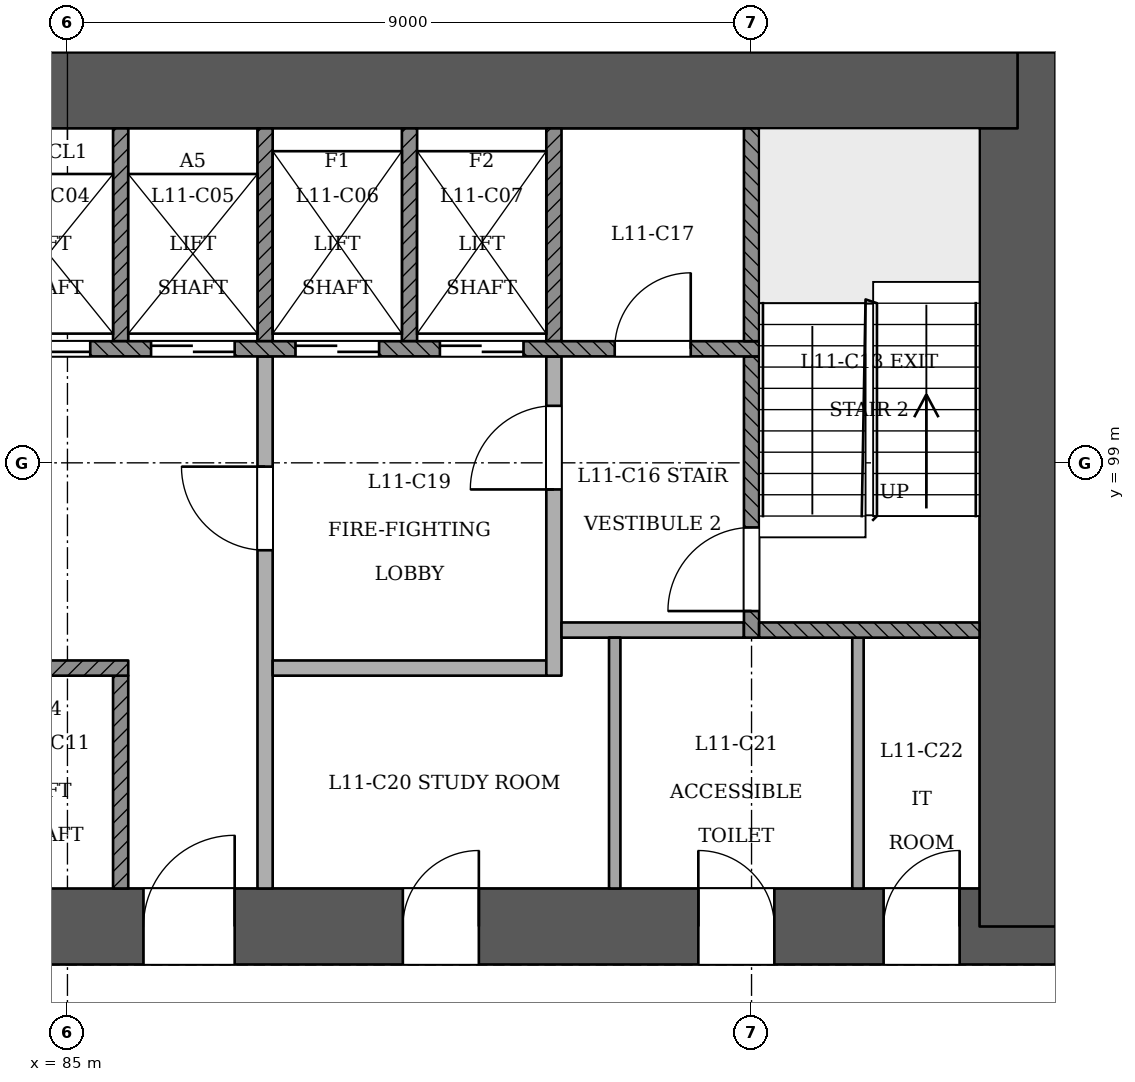
"""IFC4 building model, lengths in metres.
Left out: names, types, materials, properties, quantities, classifications, styles, units other than length and angle.
Written with IfcOpenShell. Run it as: python <this file> out.ifc"""

import sys

from ifc_helpers import new_model, si_unit, direction, frame, frame_2d, origin, place, context, subcontext, project, spatial, rectangle, extrude, element, fill, save


model = new_model("IFC4")
c1 = context("Model", 3, precision=1e-05, world=origin(), true_north=direction((0.0, 1.0)))
c2 = subcontext(c1, "Body", "Model", "MODEL_VIEW")
j1 = project(units=[si_unit("LENGTHUNIT", "METRE"), si_unit("PLANEANGLEUNIT", "RADIAN")], contexts=[c1])
p1 = place(None, origin())
s1 = spatial("IfcSite", under=j1, at=p1, CompositionType="ELEMENT")
p2 = place(p1, origin())
s2 = spatial("IfcBuilding", under=s1, at=p2, CompositionType="ELEMENT")
p3 = place(p2, frame((0.0, 0.0, 48.6)))
s3 = spatial("IfcBuildingStorey", under=s2, at=p3, CompositionType="ELEMENT", Elevation=48.6)
p4 = place(p3, frame((72.5, 92.9, 0.0), z_axis=(0.0, 0.0, 1.0), x_axis=(1.0, 0.0, 0.0)))
e1 = element("IfcWall", 1, at=p4, inside=s3, PredefinedType="SHEAR", context=c2, shape_type="SweptSolid", body=[
    extrude(rectangle(XDim=25.5, YDim=1.0, at=frame_2d((12.75, 0.0))), origin(), (0.0, 0.0, 1.0), 3.6),
])
p5 = place(p4, frame((1.3, 0.0, 0.0)))
e2 = element("IfcOpeningElement", 2, at=p5, cuts=e1, PredefinedType="OPENING", context=c2, shape_type="SweptSolid", body=[
    extrude(rectangle(XDim=1.2, YDim=2.1, at=frame_2d((0.6, 1.05))), frame((0.0, 0.51, 0.0), z_axis=(0.0, -1.0, 0.0), x_axis=(1.0, 0.0, 0.0)), (0.0, 0.0, 1.0), 1.021),
])
p6 = place(p4, frame((3.5, 0.0, 0.0)))
e3 = element("IfcOpeningElement", 3, at=p6, cuts=e1, PredefinedType="OPENING", context=c2, shape_type="SweptSolid", body=[
    extrude(rectangle(XDim=1.2, YDim=2.1, at=frame_2d((0.6, 1.05))), frame((0.0, 0.51, 0.0), z_axis=(0.0, -1.0, 0.0), x_axis=(1.0, 0.0, 0.0)), (0.0, 0.0, 1.0), 1.021),
])
p7 = place(p4, frame((13.5, 0.0, 0.0)))
e4 = element("IfcOpeningElement", 4, at=p7, cuts=e1, PredefinedType="OPENING", context=c2, shape_type="SweptSolid", body=[
    extrude(rectangle(XDim=1.2, YDim=2.1, at=frame_2d((0.6, 1.05))), frame((0.0, 0.51, 0.0), z_axis=(0.0, -1.0, 0.0), x_axis=(1.0, 0.0, 0.0)), (0.0, 0.0, 1.0), 1.021),
])
p8 = place(p4, frame((16.913, 0.0, 0.0)))
e5 = element("IfcOpeningElement", 5, at=p8, cuts=e1, PredefinedType="OPENING", context=c2, shape_type="SweptSolid", body=[
    extrude(rectangle(XDim=1.0, YDim=2.1, at=frame_2d((0.5, 1.05))), frame((0.0, 0.51, 0.0), z_axis=(0.0, -1.0, 0.0), x_axis=(1.0, 0.0, 0.0)), (0.0, 0.0, 1.0), 1.021),
])
p9 = place(p4, frame((20.8, 0.0, 0.0)))
e6 = element("IfcOpeningElement", 6, at=p9, cuts=e1, PredefinedType="OPENING", context=c2, shape_type="SweptSolid", body=[
    extrude(rectangle(XDim=1.0, YDim=2.1, at=frame_2d((0.5, 1.05))), frame((0.0, 0.51, 0.0), z_axis=(0.0, -1.0, 0.0), x_axis=(1.0, 0.0, 0.0)), (0.0, 0.0, 1.0), 1.021),
])
p10 = place(p4, frame((23.238, 0.0, 0.0)))
e7 = element("IfcOpeningElement", 7, at=p10, cuts=e1, PredefinedType="OPENING", context=c2, shape_type="SweptSolid", body=[
    extrude(rectangle(XDim=1.0, YDim=2.1, at=frame_2d((0.5, 1.05))), frame((0.0, 0.51, 0.0), z_axis=(0.0, -1.0, 0.0), x_axis=(1.0, 0.0, 0.0)), (0.0, 0.0, 1.0), 1.021),
])
p11 = place(p3, frame((97.5, 92.9, 0.0), z_axis=(0.0, 0.0, 1.0), x_axis=(0.0, 1.0, 0.0)))
e8 = element("IfcWall", 8, at=p11, inside=s3, PredefinedType="SHEAR", context=c2, shape_type="SweptSolid", body=[
    extrude(rectangle(XDim=11.5, YDim=1.0, at=frame_2d((5.75, 0.0))), origin(), (0.0, 0.0, 1.0), 3.6),
])
p12 = place(p3, frame((97.5, 103.9, 0.0), z_axis=(0.0, 0.0, 1.0), x_axis=(-1.0, 0.0, 0.0)))
e9 = element("IfcWall", 9, at=p12, inside=s3, PredefinedType="SHEAR", context=c2, shape_type="SweptSolid", body=[
    extrude(rectangle(XDim=25.5, YDim=1.0, at=frame_2d((12.75, 0.0))), origin(), (0.0, 0.0, 1.0), 3.6),
])
p13 = place(p3, frame((86.109, 58.583, 0.0), z_axis=(0.0, 0.0, 1.0), x_axis=(0.499999734377, 0.866025557142, 0.0)))
e10 = element("IfcWall", 10, at=p13, inside=s3, PredefinedType="PARTITIONING", context=c2, shape_type="SweptSolid", body=[
    extrude(rectangle(XDim=39.938, YDim=0.15, at=frame_2d((19.969, 0.0))), origin(), (0.0, 0.0, 1.0), 2.7),
])
p14 = place(p13, frame((3.619, 0.0, 0.0)))
e11 = element("IfcOpeningElement", 11, at=p14, cuts=e10, PredefinedType="OPENING", context=c2, shape_type="SweptSolid", body=[
    extrude(rectangle(XDim=1.2, YDim=2.1, at=frame_2d((0.6, 1.05))), frame((0.0, 0.085, 0.0), z_axis=(0.0, -1.0, 0.0), x_axis=(1.0, 0.0, 0.0)), (0.0, 0.0, 1.0), 0.171),
])
p15 = place(p13, frame((11.217, 0.0, 0.0)))
e12 = element("IfcOpeningElement", 12, at=p15, cuts=e10, PredefinedType="OPENING", context=c2, shape_type="SweptSolid", body=[
    extrude(rectangle(XDim=1.0, YDim=2.1, at=frame_2d((0.5, 1.05))), frame((0.0, 0.085, 0.0), z_axis=(0.0, -1.0, 0.0), x_axis=(1.0, 0.0, 0.0)), (0.0, 0.0, 1.0), 0.171),
])
p16 = place(p13, frame((13.658, 0.0, 0.0)))
e13 = element("IfcOpeningElement", 13, at=p16, cuts=e10, PredefinedType="OPENING", context=c2, shape_type="SweptSolid", body=[
    extrude(rectangle(XDim=1.0, YDim=2.1, at=frame_2d((0.5, 1.05))), frame((0.0, 0.085, 0.0), z_axis=(0.0, -1.0, 0.0), x_axis=(1.0, 0.0, 0.0)), (0.0, 0.0, 1.0), 0.171),
])
p17 = place(p13, frame((20.217, 0.0, 0.0)))
e14 = element("IfcOpeningElement", 14, at=p17, cuts=e10, PredefinedType="OPENING", context=c2, shape_type="SweptSolid", body=[
    extrude(rectangle(XDim=1.0, YDim=2.1, at=frame_2d((0.5, 1.05))), frame((0.0, 0.085, 0.0), z_axis=(0.0, -1.0, 0.0), x_axis=(1.0, 0.0, 0.0)), (0.0, 0.0, 1.0), 0.171),
])
p18 = place(p13, frame((22.658, 0.0, 0.0)))
e15 = element("IfcOpeningElement", 15, at=p18, cuts=e10, PredefinedType="OPENING", context=c2, shape_type="SweptSolid", body=[
    extrude(rectangle(XDim=1.0, YDim=2.1, at=frame_2d((0.5, 1.05))), frame((0.0, 0.085, 0.0), z_axis=(0.0, -1.0, 0.0), x_axis=(1.0, 0.0, 0.0)), (0.0, 0.0, 1.0), 0.171),
])
p19 = place(p13, frame((29.217, 0.0, 0.0)))
e16 = element("IfcOpeningElement", 16, at=p19, cuts=e10, PredefinedType="OPENING", context=c2, shape_type="SweptSolid", body=[
    extrude(rectangle(XDim=1.0, YDim=2.1, at=frame_2d((0.5, 1.05))), frame((0.0, 0.085, 0.0), z_axis=(0.0, -1.0, 0.0), x_axis=(1.0, 0.0, 0.0)), (0.0, 0.0, 1.0), 0.171),
])
p20 = place(p13, frame((31.658, 0.0, 0.0)))
e17 = element("IfcOpeningElement", 17, at=p20, cuts=e10, PredefinedType="OPENING", context=c2, shape_type="SweptSolid", body=[
    extrude(rectangle(XDim=1.0, YDim=2.1, at=frame_2d((0.5, 1.05))), frame((0.0, 0.085, 0.0), z_axis=(0.0, -1.0, 0.0), x_axis=(1.0, 0.0, 0.0)), (0.0, 0.0, 1.0), 0.171),
])
p21 = place(p13, frame((38.217, 0.0, 0.0)))
e18 = element("IfcOpeningElement", 18, at=p21, cuts=e10, PredefinedType="OPENING", context=c2, shape_type="SweptSolid", body=[
    extrude(rectangle(XDim=1.0, YDim=2.1, at=frame_2d((0.5, 1.05))), frame((0.0, 0.085, 0.0), z_axis=(0.0, -1.0, 0.0), x_axis=(1.0, 0.0, 0.0)), (0.0, 0.0, 1.0), 0.171),
])
p22 = place(p3, frame((85.7, 93.4, 0.0), z_axis=(0.0, 0.0, 1.0), x_axis=(0.0, 1.0, 0.0)))
e19 = element("IfcWall", 19, at=p22, inside=s3, PredefinedType="SOLIDWALL", context=c2, shape_type="SweptSolid", body=[
    extrude(rectangle(XDim=2.8, YDim=0.2, at=frame_2d((1.4, 0.0))), origin(), (0.0, 0.0, 1.0), 3.1),
])
p23 = place(p3, frame((87.6, 93.4, 0.0), z_axis=(0.0, 0.0, 1.0), x_axis=(0.0, 1.0, 0.0)))
e20 = element("IfcWall", 20, at=p23, inside=s3, PredefinedType="PARTITIONING", context=c2, shape_type="SweptSolid", body=[
    extrude(rectangle(XDim=7.0, YDim=0.2, at=frame_2d((3.5, 0.0))), origin(), (0.0, 0.0, 1.0), 3.1),
])
p24 = place(p23, frame((4.45, 0.0, 0.0)))
e21 = element("IfcOpeningElement", 21, at=p24, cuts=e20, PredefinedType="OPENING", context=c2, shape_type="SweptSolid", body=[
    extrude(rectangle(XDim=1.1, YDim=2.1, at=frame_2d((0.55, 1.05))), frame((0.0, 0.11, 0.0), z_axis=(0.0, -1.0, 0.0), x_axis=(1.0, 0.0, 0.0)), (0.0, 0.0, 1.0), 0.221),
])
for number, where, z_axis, x_axis in (
    (22, (92.2, 93.4, 0.0), (0.0, 0.0, 1.0), (0.0, 1.0, 0.0)),
    (23, (95.4, 93.4, 0.0), (0.0, 0.0, 1.0), (0.0, 1.0, 0.0)),
):
    element("IfcWall", number, at=place(p3, frame(where, z_axis=z_axis, x_axis=x_axis)), inside=s3, PredefinedType="PARTITIONING", context=c2, shape_type="SweptSolid", body=[
        extrude(rectangle(XDim=3.3, YDim=0.15, at=frame_2d((1.65, 0.0))), origin(), (0.0, 0.0, 1.0), 3.1),
    ])
p25 = place(p3, frame((78.0, 96.3, 0.0), z_axis=(0.0, 0.0, 1.0), x_axis=(1.0, 0.0, 0.0)))
e24 = element("IfcWall", 24, at=p25, inside=s3, PredefinedType="SOLIDWALL", context=c2, shape_type="SweptSolid", body=[
    extrude(rectangle(XDim=7.8, YDim=0.2, at=frame_2d((3.9, 0.0))), origin(), (0.0, 0.0, 1.0), 3.1),
])
p26 = place(p3, frame((87.7, 96.3, 0.0), z_axis=(0.0, 0.0, 1.0), x_axis=(1.0, 0.0, 0.0)))
e25 = element("IfcWall", 25, at=p26, inside=s3, PredefinedType="PARTITIONING", context=c2, shape_type="SweptSolid", body=[
    extrude(rectangle(XDim=3.6, YDim=0.2, at=frame_2d((1.8, 0.0))), origin(), (0.0, 0.0, 1.0), 3.1),
])
p27 = place(p3, frame((91.4, 96.2, 0.0), z_axis=(0.0, 0.0, 1.0), x_axis=(0.0, 1.0, 0.0)))
e26 = element("IfcWall", 26, at=p27, inside=s3, PredefinedType="PARTITIONING", context=c2, shape_type="SweptSolid", body=[
    extrude(rectangle(XDim=4.2, YDim=0.2, at=frame_2d((2.1, 0.0))), origin(), (0.0, 0.0, 1.0), 3.1),
])
p28 = place(p27, frame((2.45, 0.0, 0.0)))
e27 = element("IfcOpeningElement", 27, at=p28, cuts=e26, PredefinedType="OPENING", context=c2, shape_type="SweptSolid", body=[
    extrude(rectangle(XDim=1.1, YDim=2.1, at=frame_2d((0.55, 1.05))), frame((0.0, 0.11, 0.0), z_axis=(0.0, -1.0, 0.0), x_axis=(1.0, 0.0, 0.0)), (0.0, 0.0, 1.0), 0.221),
])
p29 = place(p3, frame((91.5, 96.8, 0.0), z_axis=(0.0, 0.0, 1.0), x_axis=(1.0, 0.0, 0.0)))
e28 = element("IfcWall", 28, at=p29, inside=s3, PredefinedType="PARTITIONING", context=c2, shape_type="SweptSolid", body=[
    extrude(rectangle(XDim=2.4, YDim=0.2, at=frame_2d((1.2, 0.0))), origin(), (0.0, 0.0, 1.0), 3.1),
])
p30 = place(p3, frame((94.0, 96.7, 0.0), z_axis=(0.0, 0.0, 1.0), x_axis=(0.0, 1.0, 0.0)))
e29 = element("IfcWall", 29, at=p30, inside=s3, PredefinedType="SOLIDWALL", context=c2, shape_type="SweptSolid", body=[
    extrude(rectangle(XDim=3.7, YDim=0.2, at=frame_2d((1.85, 0.0))), origin(), (0.0, 0.0, 1.0), 3.1),
])
p31 = place(p30, frame((0.35, 0.0, 0.0)))
e30 = element("IfcOpeningElement", 30, at=p31, cuts=e29, PredefinedType="OPENING", context=c2, shape_type="SweptSolid", body=[
    extrude(rectangle(XDim=1.1, YDim=2.1, at=frame_2d((0.55, 1.05))), frame((0.0, 0.11, 0.0), z_axis=(0.0, -1.0, 0.0), x_axis=(1.0, 0.0, 0.0)), (0.0, 0.0, 1.0), 0.221),
])
p32 = place(p3, frame((94.1, 96.8, 0.0), z_axis=(0.0, 0.0, 1.0), x_axis=(1.0, 0.0, 0.0)))
e31 = element("IfcWall", 31, at=p32, inside=s3, PredefinedType="SOLIDWALL", context=c2, shape_type="SweptSolid", body=[
    extrude(rectangle(XDim=2.9, YDim=0.2, at=frame_2d((1.45, 0.0))), origin(), (0.0, 0.0, 1.0), 3.1),
])
p33 = place(p3, frame((75.9, 100.5, 0.0), z_axis=(0.0, 0.0, 1.0), x_axis=(1.0, 0.0, 0.0)))
e32 = element("IfcWall", 32, at=p33, inside=s3, PredefinedType="SOLIDWALL", context=c2, shape_type="SweptSolid", body=[
    extrude(rectangle(XDim=18.2, YDim=0.2, at=frame_2d((9.1, 0.0))), origin(), (0.0, 0.0, 1.0), 3.1),
])
p34 = place(p33, frame((2.6, 0.0, 0.0)))
e33 = element("IfcOpeningElement", 33, at=p34, cuts=e32, PredefinedType="OPENING", context=c2, shape_type="SweptSolid", body=[
    extrude(rectangle(XDim=1.1, YDim=2.1, at=frame_2d((0.55, 1.05))), frame((0.0, 0.11, 0.0), z_axis=(0.0, -1.0, 0.0), x_axis=(1.0, 0.0, 0.0)), (0.0, 0.0, 1.0), 0.221),
])
p35 = place(p33, frame((4.5, 0.0, 0.0)))
e34 = element("IfcOpeningElement", 34, at=p35, cuts=e32, PredefinedType="OPENING", context=c2, shape_type="SweptSolid", body=[
    extrude(rectangle(XDim=1.1, YDim=2.1, at=frame_2d((0.55, 1.05))), frame((0.0, 0.11, 0.0), z_axis=(0.0, -1.0, 0.0), x_axis=(1.0, 0.0, 0.0)), (0.0, 0.0, 1.0), 0.221),
])
p36 = place(p33, frame((6.4, 0.0, 0.0)))
e35 = element("IfcOpeningElement", 35, at=p36, cuts=e32, PredefinedType="OPENING", context=c2, shape_type="SweptSolid", body=[
    extrude(rectangle(XDim=1.1, YDim=2.1, at=frame_2d((0.55, 1.05))), frame((0.0, 0.11, 0.0), z_axis=(0.0, -1.0, 0.0), x_axis=(1.0, 0.0, 0.0)), (0.0, 0.0, 1.0), 0.221),
])
p37 = place(p33, frame((8.3, 0.0, 0.0)))
e36 = element("IfcOpeningElement", 36, at=p37, cuts=e32, PredefinedType="OPENING", context=c2, shape_type="SweptSolid", body=[
    extrude(rectangle(XDim=1.1, YDim=2.1, at=frame_2d((0.55, 1.05))), frame((0.0, 0.11, 0.0), z_axis=(0.0, -1.0, 0.0), x_axis=(1.0, 0.0, 0.0)), (0.0, 0.0, 1.0), 0.221),
])
p38 = place(p33, frame((10.2, 0.0, 0.0)))
e37 = element("IfcOpeningElement", 37, at=p38, cuts=e32, PredefinedType="OPENING", context=c2, shape_type="SweptSolid", body=[
    extrude(rectangle(XDim=1.1, YDim=2.1, at=frame_2d((0.55, 1.05))), frame((0.0, 0.11, 0.0), z_axis=(0.0, -1.0, 0.0), x_axis=(1.0, 0.0, 0.0)), (0.0, 0.0, 1.0), 0.221),
])
p39 = place(p33, frame((12.1, 0.0, 0.0)))
e38 = element("IfcOpeningElement", 38, at=p39, cuts=e32, PredefinedType="OPENING", context=c2, shape_type="SweptSolid", body=[
    extrude(rectangle(XDim=1.1, YDim=2.1, at=frame_2d((0.55, 1.05))), frame((0.0, 0.11, 0.0), z_axis=(0.0, -1.0, 0.0), x_axis=(1.0, 0.0, 0.0)), (0.0, 0.0, 1.0), 0.221),
])
p40 = place(p33, frame((14.0, 0.0, 0.0)))
e39 = element("IfcOpeningElement", 39, at=p40, cuts=e32, PredefinedType="OPENING", context=c2, shape_type="SweptSolid", body=[
    extrude(rectangle(XDim=1.1, YDim=2.1, at=frame_2d((0.55, 1.05))), frame((0.0, 0.11, 0.0), z_axis=(0.0, -1.0, 0.0), x_axis=(1.0, 0.0, 0.0)), (0.0, 0.0, 1.0), 0.221),
])
p41 = place(p33, frame((0.65, 0.0, 0.0)))
e40 = element("IfcOpeningElement", 40, at=p41, cuts=e32, PredefinedType="OPENING", context=c2, shape_type="SweptSolid", body=[
    extrude(rectangle(XDim=1.0, YDim=2.1, at=frame_2d((0.5, 1.05))), frame((0.0, 0.11, 0.0), z_axis=(0.0, -1.0, 0.0), x_axis=(1.0, 0.0, 0.0)), (0.0, 0.0, 1.0), 0.221),
])
p42 = place(p33, frame((16.3, 0.0, 0.0)))
e41 = element("IfcOpeningElement", 41, at=p42, cuts=e32, PredefinedType="OPENING", context=c2, shape_type="SweptSolid", body=[
    extrude(rectangle(XDim=1.0, YDim=2.1, at=frame_2d((0.5, 1.05))), frame((0.0, 0.11, 0.0), z_axis=(0.0, -1.0, 0.0), x_axis=(1.0, 0.0, 0.0)), (0.0, 0.0, 1.0), 0.221),
])
for number, where, z_axis, x_axis in (
    (42, (85.7, 100.6, 0.0), (0.0, 0.0, 1.0), (0.0, 1.0, 0.0)),
    (43, (87.6, 100.6, 0.0), (0.0, 0.0, 1.0), (0.0, 1.0, 0.0)),
    (44, (89.5, 100.6, 0.0), (0.0, 0.0, 1.0), (0.0, 1.0, 0.0)),
    (45, (91.4, 100.6, 0.0), (0.0, 0.0, 1.0), (0.0, 1.0, 0.0)),
    (46, (94.0, 100.6, 0.0), (0.0, 0.0, 1.0), (0.0, 1.0, 0.0)),
):
    element("IfcWall", number, at=place(p3, frame(where, z_axis=z_axis, x_axis=x_axis)), inside=s3, PredefinedType="SOLIDWALL", context=c2, shape_type="SweptSolid", body=[
        extrude(rectangle(XDim=2.8, YDim=0.2, at=frame_2d((1.4, 0.0))), origin(), (0.0, 0.0, 1.0), 3.1),
    ])
p43 = place(p37, origin())
e47 = element("IfcDoor", 47, at=p43, inside=s3, OperationType="SLIDING_TO_LEFT", PredefinedType="NOTDEFINED", context=c2, shape_type="SweptSolid", body=[
    extrude(rectangle(XDim=1.1, YDim=2.1, at=frame_2d((0.55, 1.05))), frame((0.0, 0.025, 0.0), z_axis=(0.0, -1.0, 0.0), x_axis=(1.0, 0.0, 0.0)), (0.0, 0.0, 1.0), 0.05),
])
fill(e36, e47)
p44 = place(p38, origin())
e48 = element("IfcDoor", 48, at=p44, inside=s3, OperationType="SLIDING_TO_RIGHT", PredefinedType="NOTDEFINED", context=c2, shape_type="SweptSolid", body=[
    extrude(rectangle(XDim=1.1, YDim=2.1, at=frame_2d((0.55, 1.05))), frame((0.0, 0.025, 0.0), z_axis=(0.0, -1.0, 0.0), x_axis=(1.0, 0.0, 0.0)), (0.0, 0.0, 1.0), 0.05),
])
fill(e37, e48)
p45 = place(p39, origin())
e49 = element("IfcDoor", 49, at=p45, inside=s3, OperationType="SLIDING_TO_RIGHT", PredefinedType="NOTDEFINED", context=c2, shape_type="SweptSolid", body=[
    extrude(rectangle(XDim=1.1, YDim=2.1, at=frame_2d((0.55, 1.05))), frame((0.0, 0.025, 0.0), z_axis=(0.0, -1.0, 0.0), x_axis=(1.0, 0.0, 0.0)), (0.0, 0.0, 1.0), 0.05),
])
fill(e38, e49)
p46 = place(p40, origin())
e50 = element("IfcDoor", 50, at=p46, inside=s3, OperationType="SLIDING_TO_LEFT", PredefinedType="NOTDEFINED", context=c2, shape_type="SweptSolid", body=[
    extrude(rectangle(XDim=1.1, YDim=2.1, at=frame_2d((0.55, 1.05))), frame((0.0, 0.025, 0.0), z_axis=(0.0, -1.0, 0.0), x_axis=(1.0, 0.0, 0.0)), (0.0, 0.0, 1.0), 0.05),
])
fill(e39, e50)
p47 = place(p31, origin())
e51 = element("IfcDoor", 51, at=p47, inside=s3, OperationType="SINGLE_SWING_LEFT", PredefinedType="NOTDEFINED", context=c2, shape_type="SweptSolid", body=[
    extrude(rectangle(XDim=1.1, YDim=2.1, at=frame_2d((0.55, 1.05))), frame((0.0, 0.025, 0.0), z_axis=(0.0, -1.0, 0.0), x_axis=(1.0, 0.0, 0.0)), (0.0, 0.0, 1.0), 0.05),
])
fill(e30, e51)
p48 = place(p24, origin())
e52 = element("IfcDoor", 52, at=p48, inside=s3, OperationType="SINGLE_SWING_RIGHT", PredefinedType="NOTDEFINED", context=c2, shape_type="SweptSolid", body=[
    extrude(rectangle(XDim=1.1, YDim=2.1, at=frame_2d((0.55, 1.05))), frame((0.0, 0.025, 0.0), z_axis=(0.0, -1.0, 0.0), x_axis=(1.0, 0.0, 0.0)), (0.0, 0.0, 1.0), 0.05),
])
fill(e21, e52)
p49 = place(p28, origin())
e53 = element("IfcDoor", 53, at=p49, inside=s3, OperationType="SINGLE_SWING_LEFT", PredefinedType="NOTDEFINED", context=c2, shape_type="SweptSolid", body=[
    extrude(rectangle(XDim=1.1, YDim=2.1, at=frame_2d((0.55, 1.05))), frame((0.0, 0.025, 0.0), z_axis=(0.0, -1.0, 0.0), x_axis=(1.0, 0.0, 0.0)), (0.0, 0.0, 1.0), 0.05),
])
fill(e27, e53)
p50 = place(p7, origin())
e54 = element("IfcDoor", 54, at=p50, inside=s3, OperationType="SINGLE_SWING_RIGHT", PredefinedType="NOTDEFINED", context=c2, shape_type="SweptSolid", body=[
    extrude(rectangle(XDim=1.2, YDim=2.1, at=frame_2d((0.6, 1.05))), frame((0.0, 0.025, 0.0), z_axis=(0.0, -1.0, 0.0), x_axis=(1.0, 0.0, 0.0)), (0.0, 0.0, 1.0), 0.05),
])
fill(e4, e54)
p51 = place(p42, origin())
e55 = element("IfcDoor", 55, at=p51, inside=s3, OperationType="SINGLE_SWING_RIGHT", PredefinedType="NOTDEFINED", context=c2, shape_type="SweptSolid", body=[
    extrude(rectangle(XDim=1.0, YDim=2.1, at=frame_2d((0.5, 1.05))), frame((0.0, 0.025, 0.0), z_axis=(0.0, -1.0, 0.0), x_axis=(1.0, 0.0, 0.0)), (0.0, 0.0, 1.0), 0.05),
])
fill(e41, e55)
p52 = place(p8, origin())
e56 = element("IfcDoor", 56, at=p52, inside=s3, OperationType="SINGLE_SWING_RIGHT", PredefinedType="NOTDEFINED", context=c2, shape_type="SweptSolid", body=[
    extrude(rectangle(XDim=1.0, YDim=2.1, at=frame_2d((0.5, 1.05))), frame((0.0, 0.025, 0.0), z_axis=(0.0, -1.0, 0.0), x_axis=(1.0, 0.0, 0.0)), (0.0, 0.0, 1.0), 0.05),
])
fill(e5, e56)
p53 = place(p9, origin())
e57 = element("IfcDoor", 57, at=p53, inside=s3, OperationType="SINGLE_SWING_LEFT", PredefinedType="NOTDEFINED", context=c2, shape_type="SweptSolid", body=[
    extrude(rectangle(XDim=1.0, YDim=2.1, at=frame_2d((0.5, 1.05))), frame((0.0, 0.025, 0.0), z_axis=(0.0, -1.0, 0.0), x_axis=(1.0, 0.0, 0.0)), (0.0, 0.0, 1.0), 0.05),
])
fill(e6, e57)
p54 = place(p10, origin())
e58 = element("IfcDoor", 58, at=p54, inside=s3, OperationType="SINGLE_SWING_RIGHT", PredefinedType="NOTDEFINED", context=c2, shape_type="SweptSolid", body=[
    extrude(rectangle(XDim=1.0, YDim=2.1, at=frame_2d((0.5, 1.05))), frame((0.0, 0.025, 0.0), z_axis=(0.0, -1.0, 0.0), x_axis=(1.0, 0.0, 0.0)), (0.0, 0.0, 1.0), 0.05),
])
fill(e7, e58)
save(model, sys.argv[1])
